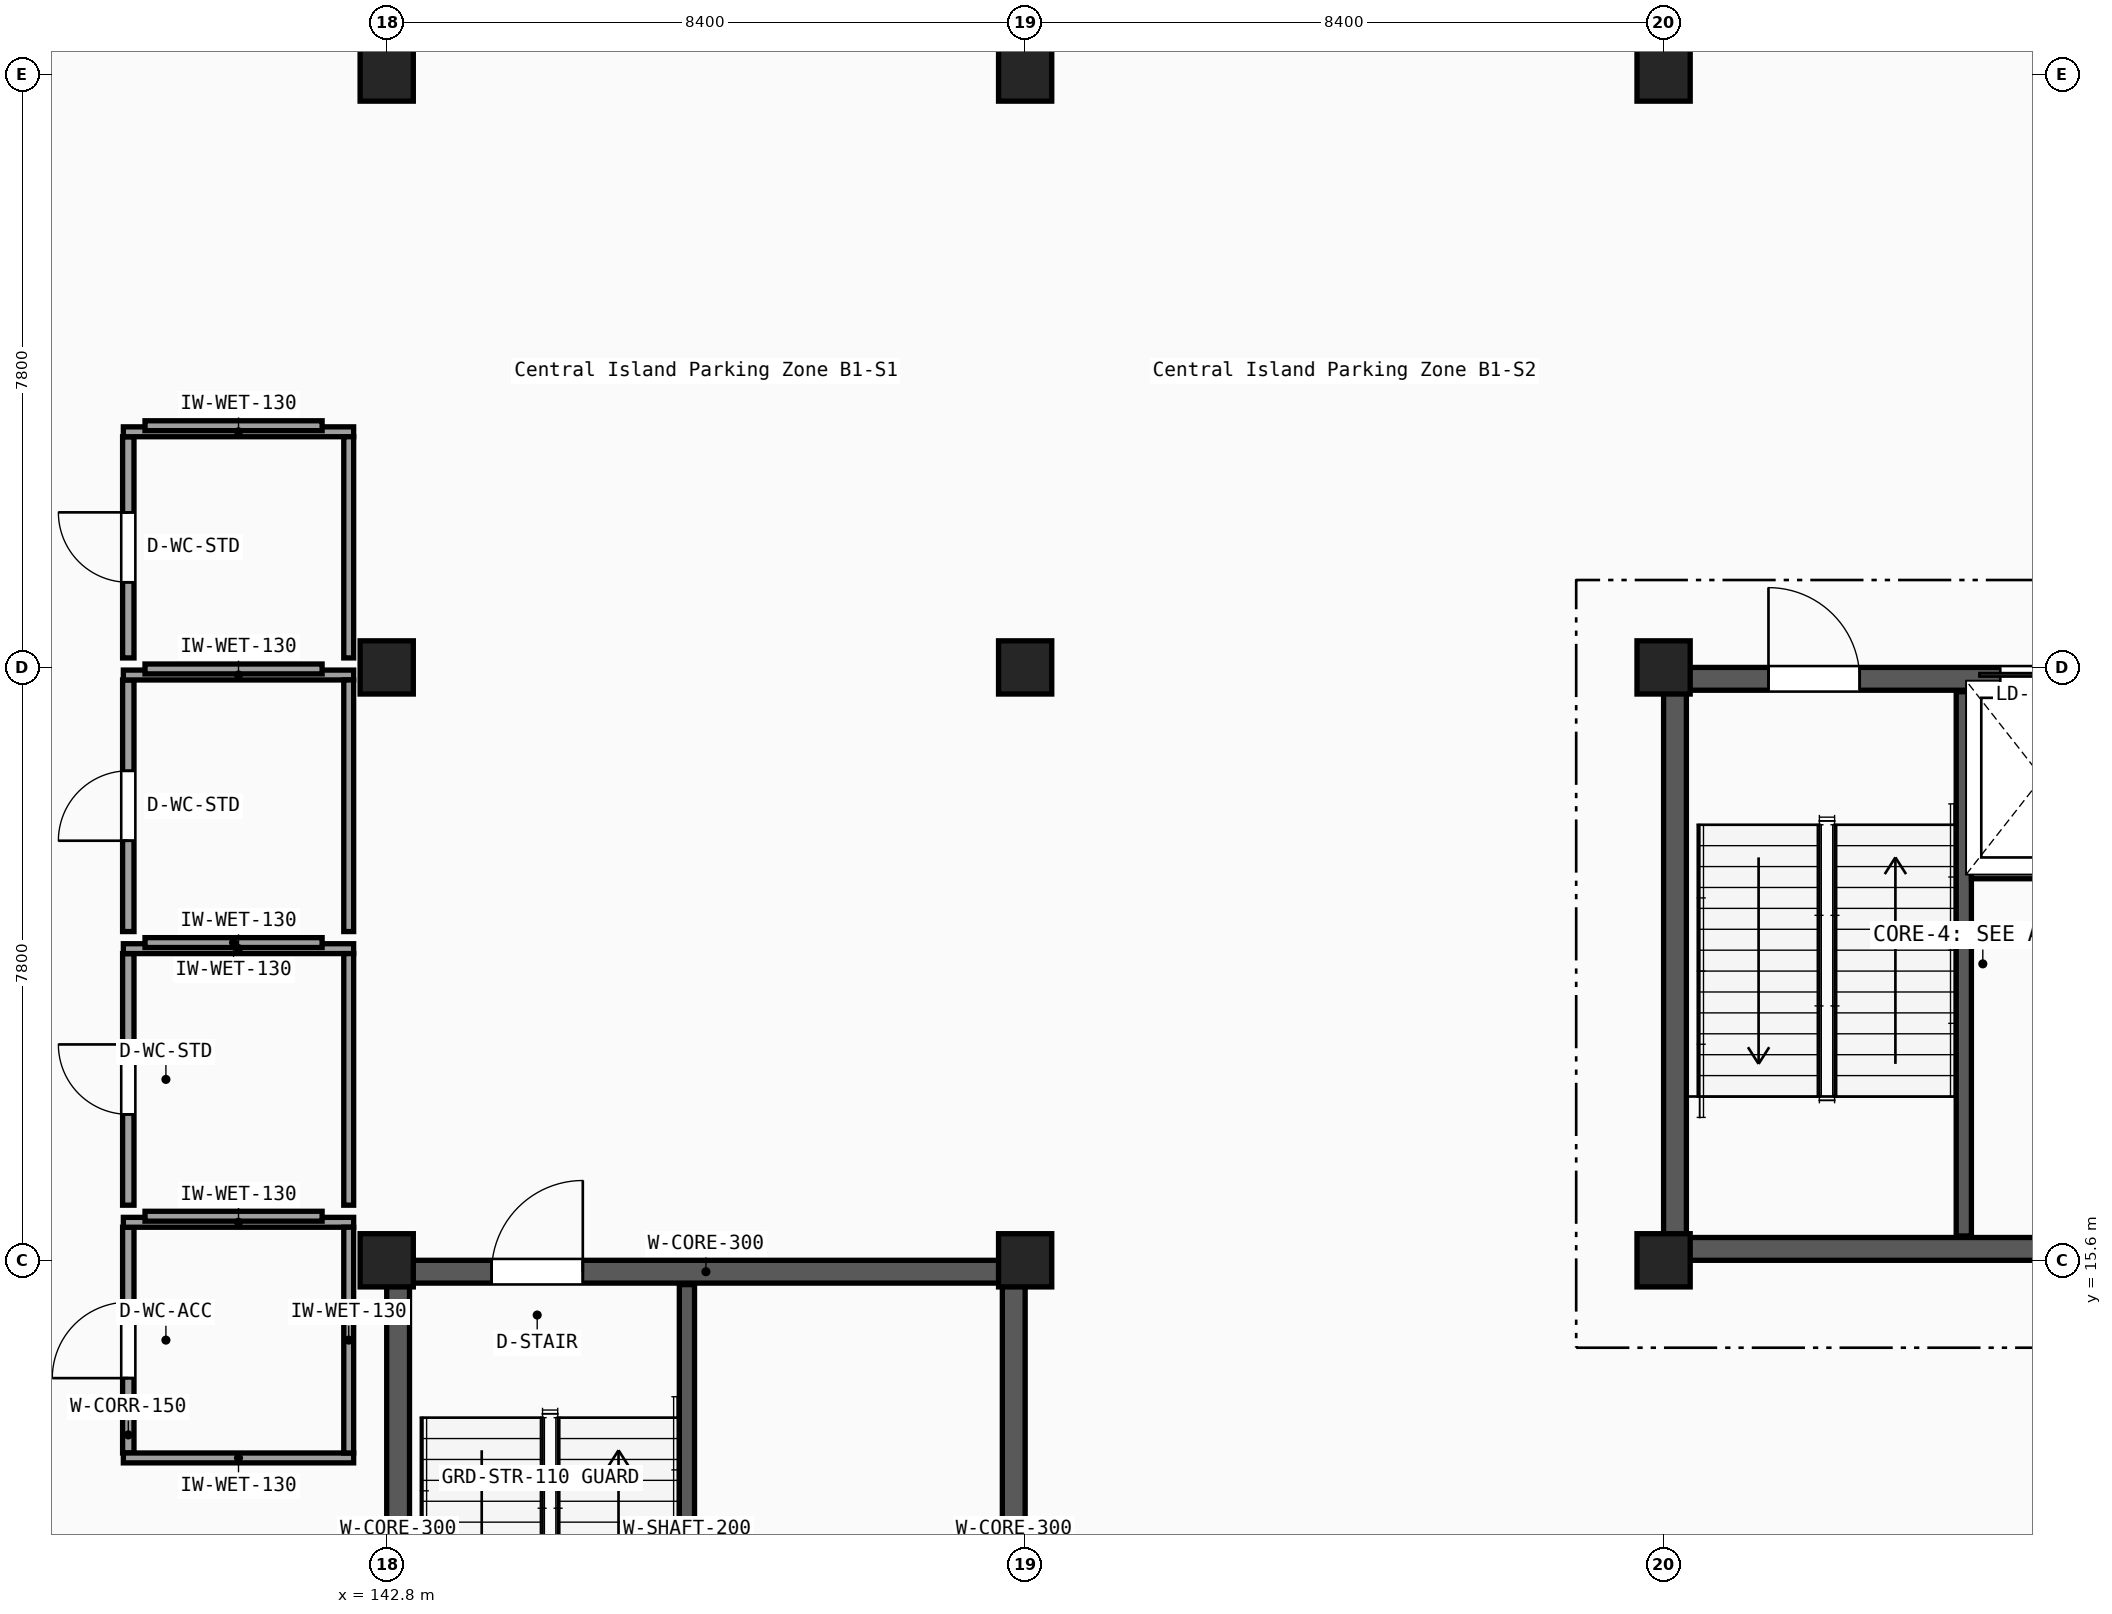
"""IFC4 building model, lengths in metres.
Left out: names, types, materials, properties, quantities, classifications, styles, units other than length and angle.
Written with IfcOpenShell. Run it as: python <this file> out.ifc"""

import sys

from ifc_helpers import new_model, si_unit, direction, frame, frame_2d, origin, origin_2d, place, context, subcontext, project, spatial, rectangle, extrude, element, fill, save


model = new_model("IFC4")
c1 = context("Model", 3, precision=1e-05, world=origin(), true_north=direction((0.0, 1.0)))
c2 = subcontext(c1, "Body", "Model", "MODEL_VIEW")
j1 = project(units=[si_unit("LENGTHUNIT", "METRE"), si_unit("PLANEANGLEUNIT", "RADIAN")], contexts=[c1])
p1 = place(None, origin())
s1 = spatial("IfcSite", under=j1, at=p1, CompositionType="ELEMENT")
p2 = place(p1, origin())
s2 = spatial("IfcBuilding", under=s1, at=p2, CompositionType="ELEMENT")
p3 = place(p2, frame((0.0, 0.0, -5.1)))
s3 = spatial("IfcBuildingStorey", under=s2, at=p3, CompositionType="ELEMENT", Elevation=-5.1)
for number, where, z_axis, x_axis in (
    (1, (142.8, 15.6, -0.22), (0.0, 0.0, 1.0), (1.0, 0.0, 0.0)),
    (2, (142.8, 23.4, -0.22), (0.0, 0.0, 1.0), (1.0, 0.0, 0.0)),
    (3, (142.8, 31.2, -0.22), (0.0, 0.0, 1.0), (1.0, 0.0, 0.0)),
    (4, (151.2, 15.6, -0.22), (0.0, 0.0, 1.0), (1.0, 0.0, 0.0)),
    (5, (151.2, 23.4, -0.22), (0.0, 0.0, 1.0), (1.0, 0.0, 0.0)),
    (6, (151.2, 31.2, -0.22), (0.0, 0.0, 1.0), (1.0, 0.0, 0.0)),
    (7, (159.6, 15.6, -0.22), (0.0, 0.0, 1.0), (1.0, 0.0, 0.0)),
    (8, (159.6, 23.4, -0.22), (0.0, 0.0, 1.0), (1.0, 0.0, 0.0)),
    (9, (159.6, 31.2, -0.22), (0.0, 0.0, 1.0), (1.0, 0.0, 0.0)),
):
    element("IfcColumn", number, at=place(p3, frame(where, z_axis=z_axis, x_axis=x_axis)), inside=s3, PredefinedType="COLUMN", context=c2, shape_type="SweptSolid", body=[
        extrude(rectangle(XDim=0.7, YDim=0.7, at=origin_2d()), origin(), (0.0, 0.0, 1.0), 5.32),
    ])
p4 = place(p3, frame((159.6, 15.75, -0.22), z_axis=(0.0, 0.0, 1.0), x_axis=(1.0, 0.0, 0.0)))
e10 = element("IfcWall", 10, at=p4, inside=s3, PredefinedType="SHEAR", context=c2, shape_type="SweptSolid", body=[
    extrude(rectangle(XDim=8.4, YDim=0.3, at=frame_2d((4.2, 0.0))), origin(), (0.0, 0.0, 1.0), 5.09),
])
p5 = place(p3, frame((159.6, 23.25, -0.22), z_axis=(0.0, 0.0, 1.0), x_axis=(1.0, 0.0, 0.0)))
e11 = element("IfcWall", 11, at=p5, inside=s3, PredefinedType="SHEAR", context=c2, shape_type="SweptSolid", body=[
    extrude(rectangle(XDim=8.4, YDim=0.3, at=frame_2d((4.2, 0.0))), origin(), (0.0, 0.0, 1.0), 5.09),
])
p6 = place(p5, frame((1.38, 0.0, 0.22)))
e12 = element("IfcOpeningElement", 12, at=p6, cuts=e11, PredefinedType="OPENING", context=c2, shape_type="SweptSolid", body=[
    extrude(rectangle(XDim=1.2, YDim=2.15, at=frame_2d((0.6, 1.075))), frame((0.0, 0.16, 0.0), z_axis=(0.0, -1.0, 0.0), x_axis=(1.0, 0.0, 0.0)), (0.0, 0.0, 1.0), 0.32),
])
p7 = place(p5, frame((4.43, 0.0, 0.22)))
e13 = element("IfcOpeningElement", 13, at=p7, cuts=e11, PredefinedType="OPENING", context=c2, shape_type="SweptSolid", body=[
    extrude(rectangle(XDim=1.1, YDim=2.15, at=frame_2d((0.55, 1.075))), frame((0.0, 0.16, 0.0), z_axis=(0.0, -1.0, 0.0), x_axis=(1.0, 0.0, 0.0)), (0.0, 0.0, 1.0), 0.32),
])
p8 = place(p5, frame((6.45, 0.0, 0.22)))
e14 = element("IfcOpeningElement", 14, at=p8, cuts=e11, PredefinedType="OPENING", context=c2, shape_type="SweptSolid", body=[
    extrude(rectangle(XDim=1.1, YDim=2.15, at=frame_2d((0.55, 1.075))), frame((0.0, 0.16, 0.0), z_axis=(0.0, -1.0, 0.0), x_axis=(1.0, 0.0, 0.0)), (0.0, 0.0, 1.0), 0.32),
])
p9 = place(p3, frame((159.75, 15.9, -0.22), z_axis=(0.0, 0.0, 1.0), x_axis=(0.0, 1.0, 0.0)))
e15 = element("IfcWall", 15, at=p9, inside=s3, PredefinedType="SHEAR", context=c2, shape_type="SweptSolid", body=[
    extrude(rectangle(XDim=7.2, YDim=0.3, at=frame_2d((3.6, 0.0))), origin(), (0.0, 0.0, 1.0), 5.09),
])
p10 = place(p3, frame((163.55, 15.92, -0.22), z_axis=(0.0, 0.0, 1.0), x_axis=(0.0, 1.0, 0.0)))
e16 = element("IfcWall", 16, at=p10, inside=s3, PredefinedType="SHEAR", context=c2, shape_type="SweptSolid", body=[
    extrude(rectangle(XDim=7.16, YDim=0.2, at=frame_2d((3.58, 0.0))), origin(), (0.0, 0.0, 1.0), 5.09),
])
p11 = place(p3, frame((163.65, 20.72, 0.0), z_axis=(0.0, 0.0, 1.0), x_axis=(1.0, 0.0, 0.0)))
e17 = element("IfcWall", 17, at=p11, inside=s3, PredefinedType="PARTITIONING", context=c2, shape_type="SweptSolid", body=[
    extrude(rectangle(XDim=1.86, YDim=0.2, at=frame_2d((0.93, 0.0))), origin(), (0.0, 0.0, 1.0), 4.25),
])
p12 = place(p3, frame((142.8, 15.45, -0.22), z_axis=(0.0, 0.0, 1.0), x_axis=(1.0, 0.0, 0.0)))
e18 = element("IfcWall", 18, at=p12, inside=s3, PredefinedType="SHEAR", context=c2, shape_type="SweptSolid", body=[
    extrude(rectangle(XDim=8.4, YDim=0.3, at=frame_2d((4.2, 0.0))), origin(), (0.0, 0.0, 1.0), 5.09),
])
p13 = place(p12, frame((1.38, 0.0, 0.22)))
e19 = element("IfcOpeningElement", 19, at=p13, cuts=e18, PredefinedType="OPENING", context=c2, shape_type="SweptSolid", body=[
    extrude(rectangle(XDim=1.2, YDim=2.15, at=frame_2d((0.6, 1.075))), frame((0.0, 0.16, 0.0), z_axis=(0.0, -1.0, 0.0), x_axis=(1.0, 0.0, 0.0)), (0.0, 0.0, 1.0), 0.32),
])
for number, where, z_axis, x_axis in (
    (20, (142.95, 8.1, -0.22), (0.0, 0.0, 1.0), (0.0, 1.0, 0.0)),
    (21, (151.05, 8.1, -0.22), (0.0, 0.0, 1.0), (0.0, 1.0, 0.0)),
):
    element("IfcWall", number, at=place(p3, frame(where, z_axis=z_axis, x_axis=x_axis)), inside=s3, PredefinedType="SHEAR", context=c2, shape_type="SweptSolid", body=[
        extrude(rectangle(XDim=7.2, YDim=0.3, at=frame_2d((3.6, 0.0))), origin(), (0.0, 0.0, 1.0), 5.09),
    ])
p14 = place(p3, frame((146.75, 8.12, -0.22), z_axis=(0.0, 0.0, 1.0), x_axis=(0.0, 1.0, 0.0)))
e22 = element("IfcWall", 22, at=p14, inside=s3, PredefinedType="SHEAR", context=c2, shape_type="SweptSolid", body=[
    extrude(rectangle(XDim=7.16, YDim=0.2, at=frame_2d((3.58, 0.0))), origin(), (0.0, 0.0, 1.0), 5.09),
])
p15 = place(p3, frame((139.4, 13.065, 0.0), z_axis=(0.0, 0.0, 1.0), x_axis=(0.0, 1.0, 0.0)))
e23 = element("IfcWall", 23, at=p15, inside=s3, PredefinedType="PARTITIONING", context=c2, shape_type="SweptSolid", body=[
    extrude(rectangle(XDim=2.97, YDim=0.15, at=frame_2d((1.485, 0.0))), origin(), (0.0, 0.0, 1.0), 4.35),
])
p16 = place(p15, frame((0.985, 0.0, 0.0)))
e24 = element("IfcOpeningElement", 24, at=p16, cuts=e23, PredefinedType="OPENING", context=c2, shape_type="SweptSolid", body=[
    extrude(rectangle(XDim=1.0, YDim=2.15, at=frame_2d((0.5, 1.075))), frame((0.0, 0.085, 0.0), z_axis=(0.0, -1.0, 0.0), x_axis=(1.0, 0.0, 0.0)), (0.0, 0.0, 1.0), 0.17),
])
for number, where, z_axis, x_axis in (
    (25, (139.335, 13.0, 0.0), (0.0, 0.0, 1.0), (1.0, 0.0, 0.0)),
    (26, (139.335, 16.1, 0.0), (0.0, 0.0, 1.0), (1.0, 0.0, 0.0)),
):
    element("IfcWall", number, at=place(p3, frame(where, z_axis=z_axis, x_axis=x_axis)), inside=s3, PredefinedType="PARTITIONING", context=c2, shape_type="SweptSolid", body=[
        extrude(rectangle(XDim=3.03, YDim=0.13, at=frame_2d((1.515, 0.0))), origin(), (0.0, 0.0, 1.0), 4.82),
    ])
p17 = place(p3, frame((142.3, 13.065, 0.0), z_axis=(0.0, 0.0, 1.0), x_axis=(0.0, 1.0, 0.0)))
e27 = element("IfcWall", 27, at=p17, inside=s3, PredefinedType="PARTITIONING", context=c2, shape_type="SweptSolid", body=[
    extrude(rectangle(XDim=2.97, YDim=0.13, at=frame_2d((1.485, 0.0))), origin(), (0.0, 0.0, 1.0), 4.35),
])
p18 = place(p3, frame((139.62, 16.18, 0.0), z_axis=(0.0, 0.0, 1.0), x_axis=(1.0, 0.0, 0.0)))
e28 = element("IfcWall", 28, at=p18, inside=s3, PredefinedType="PARTITIONING", context=c2, shape_type="SweptSolid", body=[
    extrude(rectangle(XDim=2.33, YDim=0.13, at=frame_2d((1.165, 0.0))), origin(), (0.0, 0.0, 1.0), 4.82),
])
p19 = place(p3, frame((139.4, 16.325, 0.0), z_axis=(0.0, 0.0, 1.0), x_axis=(0.0, 1.0, 0.0)))
e29 = element("IfcWall", 29, at=p19, inside=s3, PredefinedType="PARTITIONING", context=c2, shape_type="SweptSolid", body=[
    extrude(rectangle(XDim=3.31, YDim=0.15, at=frame_2d((1.655, 0.0))), origin(), (0.0, 0.0, 1.0), 4.82),
])
p20 = place(p19, frame((1.195, 0.0, 0.0)))
e30 = element("IfcOpeningElement", 30, at=p20, cuts=e29, PredefinedType="OPENING", context=c2, shape_type="SweptSolid", body=[
    extrude(rectangle(XDim=0.92, YDim=2.15, at=frame_2d((0.46, 1.075))), frame((0.0, 0.085, 0.0), z_axis=(0.0, -1.0, 0.0), x_axis=(1.0, 0.0, 0.0)), (0.0, 0.0, 1.0), 0.17),
])
p21 = place(p3, frame((139.335, 19.7, 0.0), z_axis=(0.0, 0.0, 1.0), x_axis=(1.0, 0.0, 0.0)))
e31 = element("IfcWall", 31, at=p21, inside=s3, PredefinedType="PARTITIONING", context=c2, shape_type="SweptSolid", body=[
    extrude(rectangle(XDim=3.03, YDim=0.13, at=frame_2d((1.515, 0.0))), origin(), (0.0, 0.0, 1.0), 4.82),
])
p22 = place(p3, frame((142.3, 16.325, 0.0), z_axis=(0.0, 0.0, 1.0), x_axis=(0.0, 1.0, 0.0)))
e32 = element("IfcWall", 32, at=p22, inside=s3, PredefinedType="PARTITIONING", context=c2, shape_type="SweptSolid", body=[
    extrude(rectangle(XDim=3.31, YDim=0.13, at=frame_2d((1.655, 0.0))), origin(), (0.0, 0.0, 1.0), 4.82),
])
p23 = place(p3, frame((139.62, 19.78, 0.0), z_axis=(0.0, 0.0, 1.0), x_axis=(1.0, 0.0, 0.0)))
e33 = element("IfcWall", 33, at=p23, inside=s3, PredefinedType="PARTITIONING", context=c2, shape_type="SweptSolid", body=[
    extrude(rectangle(XDim=2.33, YDim=0.13, at=frame_2d((1.165, 0.0))), origin(), (0.0, 0.0, 1.0), 4.82),
])
p24 = place(p3, frame((139.4, 19.925, 0.0), z_axis=(0.0, 0.0, 1.0), x_axis=(0.0, 1.0, 0.0)))
e34 = element("IfcWall", 34, at=p24, inside=s3, PredefinedType="PARTITIONING", context=c2, shape_type="SweptSolid", body=[
    extrude(rectangle(XDim=3.31, YDim=0.15, at=frame_2d((1.655, 0.0))), origin(), (0.0, 0.0, 1.0), 4.35),
])
p25 = place(p24, frame((1.195, 0.0, 0.0)))
e35 = element("IfcOpeningElement", 35, at=p25, cuts=e34, PredefinedType="OPENING", context=c2, shape_type="SweptSolid", body=[
    extrude(rectangle(XDim=0.92, YDim=2.15, at=frame_2d((0.46, 1.075))), frame((0.0, 0.085, 0.0), z_axis=(0.0, -1.0, 0.0), x_axis=(1.0, 0.0, 0.0)), (0.0, 0.0, 1.0), 0.17),
])
p26 = place(p3, frame((139.335, 23.3, 0.0), z_axis=(0.0, 0.0, 1.0), x_axis=(1.0, 0.0, 0.0)))
e36 = element("IfcWall", 36, at=p26, inside=s3, PredefinedType="PARTITIONING", context=c2, shape_type="SweptSolid", body=[
    extrude(rectangle(XDim=3.03, YDim=0.13, at=frame_2d((1.515, 0.0))), origin(), (0.0, 0.0, 1.0), 4.35),
])
p27 = place(p3, frame((142.3, 19.925, 0.0), z_axis=(0.0, 0.0, 1.0), x_axis=(0.0, 1.0, 0.0)))
e37 = element("IfcWall", 37, at=p27, inside=s3, PredefinedType="PARTITIONING", context=c2, shape_type="SweptSolid", body=[
    extrude(rectangle(XDim=3.31, YDim=0.13, at=frame_2d((1.655, 0.0))), origin(), (0.0, 0.0, 1.0), 4.35),
])
p28 = place(p3, frame((139.62, 23.38, 0.0), z_axis=(0.0, 0.0, 1.0), x_axis=(1.0, 0.0, 0.0)))
e38 = element("IfcWall", 38, at=p28, inside=s3, PredefinedType="PARTITIONING", context=c2, shape_type="SweptSolid", body=[
    extrude(rectangle(XDim=2.33, YDim=0.13, at=frame_2d((1.165, 0.0))), origin(), (0.0, 0.0, 1.0), 4.35),
])
p29 = place(p3, frame((139.4, 23.525, 0.0), z_axis=(0.0, 0.0, 1.0), x_axis=(0.0, 1.0, 0.0)))
e39 = element("IfcWall", 39, at=p29, inside=s3, PredefinedType="PARTITIONING", context=c2, shape_type="SweptSolid", body=[
    extrude(rectangle(XDim=2.91, YDim=0.15, at=frame_2d((1.455, 0.0))), origin(), (0.0, 0.0, 1.0), 4.35),
])
p30 = place(p29, frame((0.995, 0.0, 0.0)))
e40 = element("IfcOpeningElement", 40, at=p30, cuts=e39, PredefinedType="OPENING", context=c2, shape_type="SweptSolid", body=[
    extrude(rectangle(XDim=0.92, YDim=2.15, at=frame_2d((0.46, 1.075))), frame((0.0, 0.085, 0.0), z_axis=(0.0, -1.0, 0.0), x_axis=(1.0, 0.0, 0.0)), (0.0, 0.0, 1.0), 0.17),
])
p31 = place(p3, frame((139.335, 26.5, 0.0), z_axis=(0.0, 0.0, 1.0), x_axis=(1.0, 0.0, 0.0)))
e41 = element("IfcWall", 41, at=p31, inside=s3, PredefinedType="PARTITIONING", context=c2, shape_type="SweptSolid", body=[
    extrude(rectangle(XDim=3.03, YDim=0.13, at=frame_2d((1.515, 0.0))), origin(), (0.0, 0.0, 1.0), 4.82),
])
p32 = place(p3, frame((142.3, 23.525, 0.0), z_axis=(0.0, 0.0, 1.0), x_axis=(0.0, 1.0, 0.0)))
e42 = element("IfcWall", 42, at=p32, inside=s3, PredefinedType="PARTITIONING", context=c2, shape_type="SweptSolid", body=[
    extrude(rectangle(XDim=2.91, YDim=0.13, at=frame_2d((1.455, 0.0))), origin(), (0.0, 0.0, 1.0), 4.35),
])
p33 = place(p3, frame((139.62, 26.58, 0.0), z_axis=(0.0, 0.0, 1.0), x_axis=(1.0, 0.0, 0.0)))
e43 = element("IfcWall", 43, at=p33, inside=s3, PredefinedType="PARTITIONING", context=c2, shape_type="SweptSolid", body=[
    extrude(rectangle(XDim=2.33, YDim=0.13, at=frame_2d((1.165, 0.0))), origin(), (0.0, 0.0, 1.0), 4.82),
])
p34 = place(p6, origin())
e44 = element("IfcDoor", 44, at=p34, inside=s3, OperationType="SINGLE_SWING_LEFT", PredefinedType="DOOR", context=c2, shape_type="SweptSolid", body=[
    extrude(rectangle(XDim=1.2, YDim=2.15, at=frame_2d((0.6, 1.075))), frame((0.0, 0.025, 0.0), z_axis=(0.0, -1.0, 0.0), x_axis=(1.0, 0.0, 0.0)), (0.0, 0.0, 1.0), 0.05),
])
fill(e12, e44)
p35 = place(p7, origin())
e45 = element("IfcDoor", 45, at=p35, inside=s3, OperationType="DOUBLE_DOOR_SLIDING", PredefinedType="DOOR", context=c2, shape_type="SweptSolid", body=[
    extrude(rectangle(XDim=1.1, YDim=2.15, at=frame_2d((0.55, 1.075))), frame((0.0, 0.025, 0.0), z_axis=(0.0, -1.0, 0.0), x_axis=(1.0, 0.0, 0.0)), (0.0, 0.0, 1.0), 0.05),
])
fill(e13, e45)
p36 = place(p13, origin())
e46 = element("IfcDoor", 46, at=p36, inside=s3, OperationType="SINGLE_SWING_RIGHT", PredefinedType="DOOR", context=c2, shape_type="SweptSolid", body=[
    extrude(rectangle(XDim=1.2, YDim=2.15, at=frame_2d((0.6, 1.075))), frame((0.0, 0.025, 0.0), z_axis=(0.0, -1.0, 0.0), x_axis=(1.0, 0.0, 0.0)), (0.0, 0.0, 1.0), 0.05),
])
fill(e19, e46)
p37 = place(p16, origin())
e47 = element("IfcDoor", 47, at=p37, inside=s3, OperationType="SINGLE_SWING_LEFT", PredefinedType="DOOR", context=c2, shape_type="SweptSolid", body=[
    extrude(rectangle(XDim=1.0, YDim=2.15, at=frame_2d((0.5, 1.075))), frame((0.0, 0.025, 0.0), z_axis=(0.0, -1.0, 0.0), x_axis=(1.0, 0.0, 0.0)), (0.0, 0.0, 1.0), 0.05),
])
fill(e24, e47)
p38 = place(p20, origin())
e48 = element("IfcDoor", 48, at=p38, inside=s3, OperationType="SINGLE_SWING_RIGHT", PredefinedType="DOOR", context=c2, shape_type="SweptSolid", body=[
    extrude(rectangle(XDim=0.92, YDim=2.15, at=frame_2d((0.46, 1.075))), frame((0.0, 0.025, 0.0), z_axis=(0.0, -1.0, 0.0), x_axis=(1.0, 0.0, 0.0)), (0.0, 0.0, 1.0), 0.05),
])
fill(e30, e48)
p39 = place(p25, origin())
e49 = element("IfcDoor", 49, at=p39, inside=s3, OperationType="SINGLE_SWING_LEFT", PredefinedType="DOOR", context=c2, shape_type="SweptSolid", body=[
    extrude(rectangle(XDim=0.92, YDim=2.15, at=frame_2d((0.46, 1.075))), frame((0.0, 0.025, 0.0), z_axis=(0.0, -1.0, 0.0), x_axis=(1.0, 0.0, 0.0)), (0.0, 0.0, 1.0), 0.05),
])
fill(e35, e49)
p40 = place(p30, origin())
e50 = element("IfcDoor", 50, at=p40, inside=s3, OperationType="SINGLE_SWING_RIGHT", PredefinedType="DOOR", context=c2, shape_type="SweptSolid", body=[
    extrude(rectangle(XDim=0.92, YDim=2.15, at=frame_2d((0.46, 1.075))), frame((0.0, 0.025, 0.0), z_axis=(0.0, -1.0, 0.0), x_axis=(1.0, 0.0, 0.0)), (0.0, 0.0, 1.0), 0.05),
])
fill(e40, e50)
save(model, sys.argv[1])
